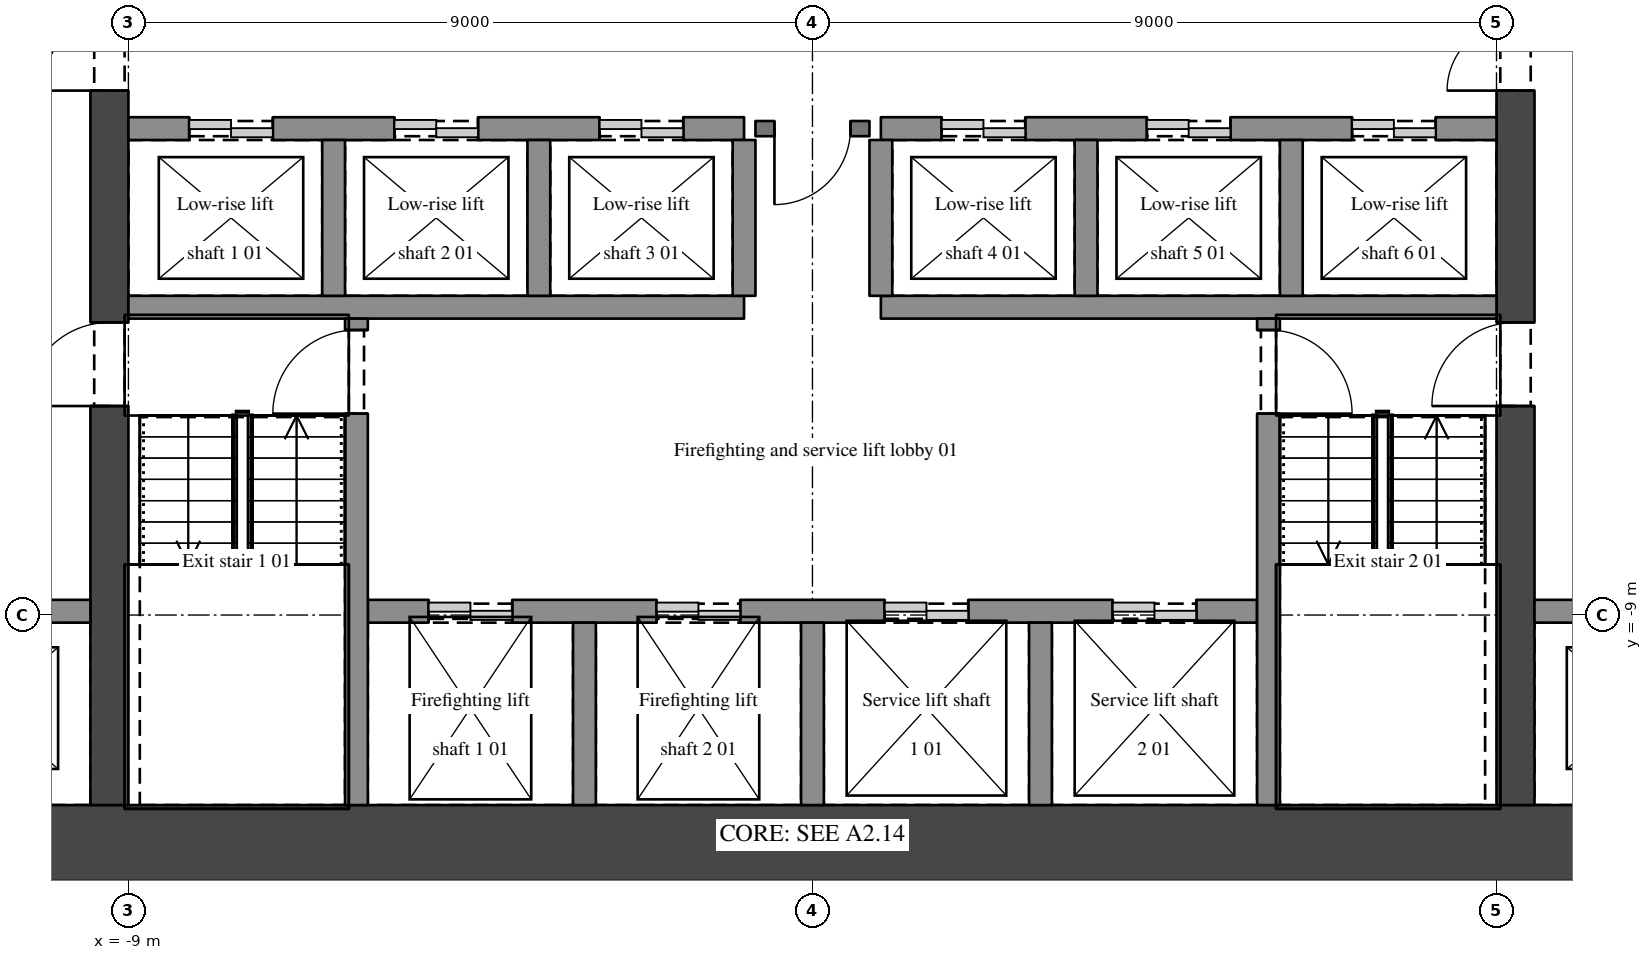
"""IFC4 building model, lengths in metres.
Left out: names, types, materials, properties, quantities, classifications, styles, units other than length and angle.
Written with IfcOpenShell. Run it as: python <this file> out.ifc"""

import sys

from ifc_helpers import new_model, si_unit, direction, frame, frame_2d, origin, place, context, subcontext, project, spatial, rectangle, extrude, element, fill, save


model = new_model("IFC4")
c1 = context("Model", 3, precision=1e-05, world=origin(), true_north=direction((0.0, 1.0)))
c2 = subcontext(c1, "Body", "Model", "MODEL_VIEW")
j1 = project(units=[si_unit("LENGTHUNIT", "METRE"), si_unit("PLANEANGLEUNIT", "RADIAN")], contexts=[c1])
p1 = place(None, origin())
s1 = spatial("IfcSite", under=j1, at=p1, CompositionType="ELEMENT")
p2 = place(p1, origin())
s2 = spatial("IfcBuilding", under=s1, at=p2, CompositionType="ELEMENT")
p3 = place(p2, frame((0.0, 0.0, 108.9)))
s3 = spatial("IfcBuildingStorey", under=s2, at=p3, CompositionType="ELEMENT", Elevation=108.9)
p4 = place(p3, frame((-15.0, -12.0, 0.0), z_axis=(0.0, 0.0, 1.0), x_axis=(1.0, 0.0, 0.0)))
e1 = element("IfcWall", 1, at=p4, inside=s3, PredefinedType="SHEAR", context=c2, shape_type="SweptSolid", body=[
    extrude(rectangle(XDim=30.0, YDim=1.0, at=frame_2d((15.0, 0.0))), origin(), (0.0, 0.0, 1.0), 5.4),
])
p5 = place(p3, frame((-9.25, -11.5, 0.0), z_axis=(0.0, 0.0, 1.0), x_axis=(0.0, 1.0, 0.0)))
e2 = element("IfcWall", 2, at=p5, inside=s3, PredefinedType="SHEAR", context=c2, shape_type="SweptSolid", body=[
    extrude(rectangle(XDim=11.65, YDim=0.5, at=frame_2d((5.825, 0.0))), origin(), (0.0, 0.0, 1.0), 5.4),
])
p6 = place(p5, frame((9.4, 0.0, 0.0)))
e3 = element("IfcOpeningElement", 3, at=p6, cuts=e2, PredefinedType="OPENING", context=c2, shape_type="SweptSolid", body=[
    extrude(rectangle(XDim=1.8, YDim=2.1, at=frame_2d((0.9, 1.05))), frame((0.0, 0.26, 0.0), z_axis=(0.0, -1.0, 0.0), x_axis=(1.0, 0.0, 0.0)), (0.0, 0.0, 1.0), 0.52),
])
p7 = place(p5, frame((5.25, 0.0, 0.0)))
e4 = element("IfcOpeningElement", 4, at=p7, cuts=e2, PredefinedType="OPENING", context=c2, shape_type="SweptSolid", body=[
    extrude(rectangle(XDim=1.1, YDim=2.1, at=frame_2d((0.55, 1.05))), frame((0.0, 0.26, 0.0), z_axis=(0.0, -1.0, 0.0), x_axis=(1.0, 0.0, 0.0)), (0.0, 0.0, 1.0), 0.52),
])
p8 = place(p3, frame((9.25, -11.5, 0.0), z_axis=(0.0, 0.0, 1.0), x_axis=(0.0, 1.0, 0.0)))
e5 = element("IfcWall", 5, at=p8, inside=s3, PredefinedType="SHEAR", context=c2, shape_type="SweptSolid", body=[
    extrude(rectangle(XDim=11.65, YDim=0.5, at=frame_2d((5.825, 0.0))), origin(), (0.0, 0.0, 1.0), 5.4),
])
p9 = place(p8, frame((9.4, 0.0, 0.0)))
e6 = element("IfcOpeningElement", 6, at=p9, cuts=e5, PredefinedType="OPENING", context=c2, shape_type="SweptSolid", body=[
    extrude(rectangle(XDim=1.8, YDim=2.1, at=frame_2d((0.9, 1.05))), frame((0.0, 0.26, 0.0), z_axis=(0.0, -1.0, 0.0), x_axis=(1.0, 0.0, 0.0)), (0.0, 0.0, 1.0), 0.52),
])
p10 = place(p8, frame((5.25, 0.0, 0.0)))
e7 = element("IfcOpeningElement", 7, at=p10, cuts=e5, PredefinedType="OPENING", context=c2, shape_type="SweptSolid", body=[
    extrude(rectangle(XDim=1.1, YDim=2.1, at=frame_2d((0.55, 1.05))), frame((0.0, 0.26, 0.0), z_axis=(0.0, -1.0, 0.0), x_axis=(1.0, 0.0, 0.0)), (0.0, 0.0, 1.0), 0.52),
])
p11 = place(p3, frame((-12.25, -8.95, 0.0), z_axis=(0.0, 0.0, 1.0), x_axis=(1.0, 0.0, 0.0)))
e8 = element("IfcWall", 8, at=p11, inside=s3, PredefinedType="SHEAR", context=c2, shape_type="SweptSolid", body=[
    extrude(rectangle(XDim=2.75, YDim=0.3, at=frame_2d((1.375, 0.0))), origin(), (0.0, 0.0, 1.0), 5.4),
])
p12 = place(p11, frame((0.825, 0.0, 0.0)))
e9 = element("IfcOpeningElement", 9, at=p12, cuts=e8, PredefinedType="OPENING", context=c2, shape_type="SweptSolid", body=[
    extrude(rectangle(XDim=1.1, YDim=2.1, at=frame_2d((0.55, 1.05))), frame((0.0, 0.16, 0.0), z_axis=(0.0, -1.0, 0.0), x_axis=(1.0, 0.0, 0.0)), (0.0, 0.0, 1.0), 0.32),
])
p13 = place(p3, frame((-5.85, -8.95, 0.0), z_axis=(0.0, 0.0, 1.0), x_axis=(1.0, 0.0, 0.0)))
e10 = element("IfcWall", 10, at=p13, inside=s3, PredefinedType="SHEAR", context=c2, shape_type="SweptSolid", body=[
    extrude(rectangle(XDim=11.7, YDim=0.3, at=frame_2d((5.85, 0.0))), origin(), (0.0, 0.0, 1.0), 5.4),
])
p14 = place(p13, frame((0.8, 0.0, 0.0)))
e11 = element("IfcOpeningElement", 11, at=p14, cuts=e10, PredefinedType="OPENING", context=c2, shape_type="SweptSolid", body=[
    extrude(rectangle(XDim=1.1, YDim=2.1, at=frame_2d((0.55, 1.05))), frame((0.0, 0.16, 0.0), z_axis=(0.0, -1.0, 0.0), x_axis=(1.0, 0.0, 0.0)), (0.0, 0.0, 1.0), 0.32),
])
p15 = place(p13, frame((3.8, 0.0, 0.0)))
e12 = element("IfcOpeningElement", 12, at=p15, cuts=e10, PredefinedType="OPENING", context=c2, shape_type="SweptSolid", body=[
    extrude(rectangle(XDim=1.1, YDim=2.1, at=frame_2d((0.55, 1.05))), frame((0.0, 0.16, 0.0), z_axis=(0.0, -1.0, 0.0), x_axis=(1.0, 0.0, 0.0)), (0.0, 0.0, 1.0), 0.32),
])
p16 = place(p13, frame((6.8, 0.0, 0.0)))
e13 = element("IfcOpeningElement", 13, at=p16, cuts=e10, PredefinedType="OPENING", context=c2, shape_type="SweptSolid", body=[
    extrude(rectangle(XDim=1.1, YDim=2.1, at=frame_2d((0.55, 1.05))), frame((0.0, 0.16, 0.0), z_axis=(0.0, -1.0, 0.0), x_axis=(1.0, 0.0, 0.0)), (0.0, 0.0, 1.0), 0.32),
])
p17 = place(p13, frame((9.8, 0.0, 0.0)))
e14 = element("IfcOpeningElement", 14, at=p17, cuts=e10, PredefinedType="OPENING", context=c2, shape_type="SweptSolid", body=[
    extrude(rectangle(XDim=1.1, YDim=2.1, at=frame_2d((0.55, 1.05))), frame((0.0, 0.16, 0.0), z_axis=(0.0, -1.0, 0.0), x_axis=(1.0, 0.0, 0.0)), (0.0, 0.0, 1.0), 0.32),
])
p18 = place(p3, frame((9.5, -8.95, 0.0), z_axis=(0.0, 0.0, 1.0), x_axis=(1.0, 0.0, 0.0)))
e15 = element("IfcWall", 15, at=p18, inside=s3, PredefinedType="SHEAR", context=c2, shape_type="SweptSolid", body=[
    extrude(rectangle(XDim=2.75, YDim=0.3, at=frame_2d((1.375, 0.0))), origin(), (0.0, 0.0, 1.0), 5.4),
])
p19 = place(p18, frame((0.825, 0.0, 0.0)))
e16 = element("IfcOpeningElement", 16, at=p19, cuts=e15, PredefinedType="OPENING", context=c2, shape_type="SweptSolid", body=[
    extrude(rectangle(XDim=1.1, YDim=2.1, at=frame_2d((0.55, 1.05))), frame((0.0, 0.16, 0.0), z_axis=(0.0, -1.0, 0.0), x_axis=(1.0, 0.0, 0.0)), (0.0, 0.0, 1.0), 0.32),
])
for number, where, z_axis, x_axis in (
    (17, (-9.0, -4.95, 0.0), (0.0, 0.0, 1.0), (1.0, 0.0, 0.0)),
    (18, (0.9, -4.95, 0.0), (0.0, 0.0, 1.0), (1.0, 0.0, 0.0)),
):
    element("IfcWall", number, at=place(p3, frame(where, z_axis=z_axis, x_axis=x_axis)), inside=s3, PredefinedType="SHEAR", context=c2, shape_type="SweptSolid", body=[
        extrude(rectangle(XDim=8.1, YDim=0.3, at=frame_2d((4.05, 0.0))), origin(), (0.0, 0.0, 1.0), 5.4),
    ])
p20 = place(p3, frame((-9.0, -2.6, 0.0), z_axis=(0.0, 0.0, 1.0), x_axis=(1.0, 0.0, 0.0)))
e19 = element("IfcWall", 19, at=p20, inside=s3, PredefinedType="SHEAR", context=c2, shape_type="SweptSolid", body=[
    extrude(rectangle(XDim=8.1, YDim=0.3, at=frame_2d((4.05, 0.0))), origin(), (0.0, 0.0, 1.0), 5.4),
])
p21 = place(p20, frame((0.8, 0.0, 0.0)))
e20 = element("IfcOpeningElement", 20, at=p21, cuts=e19, PredefinedType="OPENING", context=c2, shape_type="SweptSolid", body=[
    extrude(rectangle(XDim=1.1, YDim=2.1, at=frame_2d((0.55, 1.05))), frame((0.0, 0.16, 0.0), z_axis=(0.0, -1.0, 0.0), x_axis=(1.0, 0.0, 0.0)), (0.0, 0.0, 1.0), 0.32),
])
p22 = place(p20, frame((3.5, 0.0, 0.0)))
e21 = element("IfcOpeningElement", 21, at=p22, cuts=e19, PredefinedType="OPENING", context=c2, shape_type="SweptSolid", body=[
    extrude(rectangle(XDim=1.1, YDim=2.1, at=frame_2d((0.55, 1.05))), frame((0.0, 0.16, 0.0), z_axis=(0.0, -1.0, 0.0), x_axis=(1.0, 0.0, 0.0)), (0.0, 0.0, 1.0), 0.32),
])
p23 = place(p20, frame((6.2, 0.0, 0.0)))
e22 = element("IfcOpeningElement", 22, at=p23, cuts=e19, PredefinedType="OPENING", context=c2, shape_type="SweptSolid", body=[
    extrude(rectangle(XDim=1.1, YDim=2.1, at=frame_2d((0.55, 1.05))), frame((0.0, 0.16, 0.0), z_axis=(0.0, -1.0, 0.0), x_axis=(1.0, 0.0, 0.0)), (0.0, 0.0, 1.0), 0.32),
])
p24 = place(p3, frame((0.75, -2.6, 0.0), z_axis=(0.0, 0.0, 1.0), x_axis=(-1.0, 0.0, 0.0)))
e23 = element("IfcWall", 23, at=p24, inside=s3, PredefinedType="SOLIDWALL", context=c2, shape_type="SweptSolid", body=[
    extrude(rectangle(XDim=1.5, YDim=0.2, at=frame_2d((0.75, 0.0))), origin(), (0.0, 0.0, 1.0), 5.1),
])
p25 = place(p24, frame((0.25, 0.0, 0.0)))
e24 = element("IfcOpeningElement", 24, at=p25, cuts=e23, PredefinedType="OPENING", context=c2, shape_type="SweptSolid", body=[
    extrude(rectangle(XDim=1.0, YDim=2.1, at=frame_2d((0.5, 1.05))), frame((0.0, 0.11, 0.0), z_axis=(0.0, -1.0, 0.0), x_axis=(1.0, 0.0, 0.0)), (0.0, 0.0, 1.0), 0.22),
])
p26 = place(p3, frame((0.9, -2.6, 0.0), z_axis=(0.0, 0.0, 1.0), x_axis=(1.0, 0.0, 0.0)))
e25 = element("IfcWall", 25, at=p26, inside=s3, PredefinedType="SHEAR", context=c2, shape_type="SweptSolid", body=[
    extrude(rectangle(XDim=8.1, YDim=0.3, at=frame_2d((4.05, 0.0))), origin(), (0.0, 0.0, 1.0), 5.4),
])
p27 = place(p26, frame((0.8, 0.0, 0.0)))
e26 = element("IfcOpeningElement", 26, at=p27, cuts=e25, PredefinedType="OPENING", context=c2, shape_type="SweptSolid", body=[
    extrude(rectangle(XDim=1.1, YDim=2.1, at=frame_2d((0.55, 1.05))), frame((0.0, 0.16, 0.0), z_axis=(0.0, -1.0, 0.0), x_axis=(1.0, 0.0, 0.0)), (0.0, 0.0, 1.0), 0.32),
])
p28 = place(p26, frame((3.5, 0.0, 0.0)))
e27 = element("IfcOpeningElement", 27, at=p28, cuts=e25, PredefinedType="OPENING", context=c2, shape_type="SweptSolid", body=[
    extrude(rectangle(XDim=1.1, YDim=2.1, at=frame_2d((0.55, 1.05))), frame((0.0, 0.16, 0.0), z_axis=(0.0, -1.0, 0.0), x_axis=(1.0, 0.0, 0.0)), (0.0, 0.0, 1.0), 0.32),
])
p29 = place(p26, frame((6.2, 0.0, 0.0)))
e28 = element("IfcOpeningElement", 28, at=p29, cuts=e25, PredefinedType="OPENING", context=c2, shape_type="SweptSolid", body=[
    extrude(rectangle(XDim=1.1, YDim=2.1, at=frame_2d((0.55, 1.05))), frame((0.0, 0.16, 0.0), z_axis=(0.0, -1.0, 0.0), x_axis=(1.0, 0.0, 0.0)), (0.0, 0.0, 1.0), 0.32),
])
p30 = place(p3, frame((-6.3, -4.8, 0.0), z_axis=(0.0, 0.0, 1.0), x_axis=(0.0, 1.0, 0.0)))
e29 = element("IfcWall", 29, at=p30, inside=s3, PredefinedType="SHEAR", context=c2, shape_type="SweptSolid", body=[
    extrude(rectangle(XDim=2.05, YDim=0.3, at=frame_2d((1.025, 0.0))), origin(), (0.0, 0.0, 1.0), 5.4),
])
p31 = place(p3, frame((-6.0, -11.5, 0.0), z_axis=(0.0, 0.0, 1.0), x_axis=(0.0, 1.0, 0.0)))
e30 = element("IfcWall", 30, at=p31, inside=s3, PredefinedType="SHEAR", context=c2, shape_type="SweptSolid", body=[
    extrude(rectangle(XDim=6.4, YDim=0.3, at=frame_2d((3.2, 0.0))), origin(), (0.0, 0.0, 1.0), 5.4),
])
p32 = place(p31, frame((5.15, 0.0, 0.0)))
e31 = element("IfcOpeningElement", 31, at=p32, cuts=e30, PredefinedType="OPENING", context=c2, shape_type="SweptSolid", body=[
    extrude(rectangle(XDim=1.1, YDim=2.1, at=frame_2d((0.55, 1.05))), frame((0.0, 0.16, 0.0), z_axis=(0.0, -1.0, 0.0), x_axis=(1.0, 0.0, 0.0)), (0.0, 0.0, 1.0), 0.32),
])
p33 = place(p3, frame((-3.6, -4.8, 0.0), z_axis=(0.0, 0.0, 1.0), x_axis=(0.0, 1.0, 0.0)))
e32 = element("IfcWall", 32, at=p33, inside=s3, PredefinedType="SHEAR", context=c2, shape_type="SweptSolid", body=[
    extrude(rectangle(XDim=2.05, YDim=0.3, at=frame_2d((1.025, 0.0))), origin(), (0.0, 0.0, 1.0), 5.4),
])
p34 = place(p3, frame((-3.0, -11.5, 0.0), z_axis=(0.0, 0.0, 1.0), x_axis=(0.0, 1.0, 0.0)))
e33 = element("IfcWall", 33, at=p34, inside=s3, PredefinedType="SHEAR", context=c2, shape_type="SweptSolid", body=[
    extrude(rectangle(XDim=2.4, YDim=0.3, at=frame_2d((1.2, 0.0))), origin(), (0.0, 0.0, 1.0), 5.4),
])
p35 = place(p3, frame((-0.9, -4.8, 0.0), z_axis=(0.0, 0.0, 1.0), x_axis=(0.0, 1.0, 0.0)))
e34 = element("IfcWall", 34, at=p35, inside=s3, PredefinedType="SHEAR", context=c2, shape_type="SweptSolid", body=[
    extrude(rectangle(XDim=2.05, YDim=0.3, at=frame_2d((1.025, 0.0))), origin(), (0.0, 0.0, 1.0), 5.4),
])
p36 = place(p3, frame((0.0, -11.5, 0.0), z_axis=(0.0, 0.0, 1.0), x_axis=(0.0, 1.0, 0.0)))
e35 = element("IfcWall", 35, at=p36, inside=s3, PredefinedType="SHEAR", context=c2, shape_type="SweptSolid", body=[
    extrude(rectangle(XDim=2.4, YDim=0.3, at=frame_2d((1.2, 0.0))), origin(), (0.0, 0.0, 1.0), 5.4),
])
p37 = place(p3, frame((0.9, -4.8, 0.0), z_axis=(0.0, 0.0, 1.0), x_axis=(0.0, 1.0, 0.0)))
e36 = element("IfcWall", 36, at=p37, inside=s3, PredefinedType="SHEAR", context=c2, shape_type="SweptSolid", body=[
    extrude(rectangle(XDim=2.05, YDim=0.3, at=frame_2d((1.025, 0.0))), origin(), (0.0, 0.0, 1.0), 5.4),
])
p38 = place(p3, frame((3.0, -11.5, 0.0), z_axis=(0.0, 0.0, 1.0), x_axis=(0.0, 1.0, 0.0)))
e37 = element("IfcWall", 37, at=p38, inside=s3, PredefinedType="SHEAR", context=c2, shape_type="SweptSolid", body=[
    extrude(rectangle(XDim=2.4, YDim=0.3, at=frame_2d((1.2, 0.0))), origin(), (0.0, 0.0, 1.0), 5.4),
])
p39 = place(p3, frame((3.6, -4.8, 0.0), z_axis=(0.0, 0.0, 1.0), x_axis=(0.0, 1.0, 0.0)))
e38 = element("IfcWall", 38, at=p39, inside=s3, PredefinedType="SHEAR", context=c2, shape_type="SweptSolid", body=[
    extrude(rectangle(XDim=2.05, YDim=0.3, at=frame_2d((1.025, 0.0))), origin(), (0.0, 0.0, 1.0), 5.4),
])
p40 = place(p3, frame((6.0, -5.1, 0.0), z_axis=(0.0, 0.0, 1.0), x_axis=(0.0, -1.0, 0.0)))
e39 = element("IfcWall", 39, at=p40, inside=s3, PredefinedType="SHEAR", context=c2, shape_type="SweptSolid", body=[
    extrude(rectangle(XDim=6.4, YDim=0.3, at=frame_2d((3.2, 0.0))), origin(), (0.0, 0.0, 1.0), 5.4),
])
p41 = place(p40, frame((0.15, 0.0, 0.0)))
e40 = element("IfcOpeningElement", 40, at=p41, cuts=e39, PredefinedType="OPENING", context=c2, shape_type="SweptSolid", body=[
    extrude(rectangle(XDim=1.1, YDim=2.1, at=frame_2d((0.55, 1.05))), frame((0.0, 0.16, 0.0), z_axis=(0.0, -1.0, 0.0), x_axis=(1.0, 0.0, 0.0)), (0.0, 0.0, 1.0), 0.32),
])
p42 = place(p3, frame((6.3, -4.8, 0.0), z_axis=(0.0, 0.0, 1.0), x_axis=(0.0, 1.0, 0.0)))
e41 = element("IfcWall", 41, at=p42, inside=s3, PredefinedType="SHEAR", context=c2, shape_type="SweptSolid", body=[
    extrude(rectangle(XDim=2.05, YDim=0.3, at=frame_2d((1.025, 0.0))), origin(), (0.0, 0.0, 1.0), 5.4),
])
p43 = place(p9, origin())
e42 = element("IfcDoor", 42, at=p43, inside=s3, OperationType="DOUBLE_DOOR_SINGLE_SWING", PredefinedType="DOOR", context=c2, shape_type="SweptSolid", body=[
    extrude(rectangle(XDim=1.8, YDim=2.1, at=frame_2d((0.9, 1.05))), frame((0.0, 0.025, 0.0), z_axis=(0.0, -1.0, 0.0), x_axis=(1.0, 0.0, 0.0)), (0.0, 0.0, 1.0), 0.05),
])
fill(e6, e42)
p44 = place(p6, origin())
e43 = element("IfcDoor", 43, at=p44, inside=s3, OperationType="DOUBLE_DOOR_SINGLE_SWING", PredefinedType="DOOR", context=c2, shape_type="SweptSolid", body=[
    extrude(rectangle(XDim=1.8, YDim=2.1, at=frame_2d((0.9, 1.05))), frame((0.0, 0.025, 0.0), z_axis=(0.0, -1.0, 0.0), x_axis=(1.0, 0.0, 0.0)), (0.0, 0.0, 1.0), 0.05),
])
fill(e3, e43)
p45 = place(p25, origin())
e44 = element("IfcDoor", 44, at=p45, inside=s3, OperationType="SINGLE_SWING_RIGHT", PredefinedType="DOOR", context=c2, shape_type="SweptSolid", body=[
    extrude(rectangle(XDim=1.0, YDim=2.1, at=frame_2d((0.5, 1.05))), frame((0.0, 0.025, 0.0), z_axis=(0.0, -1.0, 0.0), x_axis=(1.0, 0.0, 0.0)), (0.0, 0.0, 1.0), 0.05),
])
fill(e24, e44)
p46 = place(p32, origin())
e45 = element("IfcDoor", 45, at=p46, inside=s3, OperationType="SINGLE_SWING_LEFT", PredefinedType="DOOR", context=c2, shape_type="SweptSolid", body=[
    extrude(rectangle(XDim=1.1, YDim=2.1, at=frame_2d((0.55, 1.05))), frame((0.0, 0.025, 0.0), z_axis=(0.0, -1.0, 0.0), x_axis=(1.0, 0.0, 0.0)), (0.0, 0.0, 1.0), 0.05),
])
fill(e31, e45)
p47 = place(p7, origin())
e46 = element("IfcDoor", 46, at=p47, inside=s3, OperationType="SINGLE_SWING_LEFT", PredefinedType="DOOR", context=c2, shape_type="SweptSolid", body=[
    extrude(rectangle(XDim=1.1, YDim=2.1, at=frame_2d((0.55, 1.05))), frame((0.0, 0.025, 0.0), z_axis=(0.0, -1.0, 0.0), x_axis=(1.0, 0.0, 0.0)), (0.0, 0.0, 1.0), 0.05),
])
fill(e4, e46)
p48 = place(p41, origin())
e47 = element("IfcDoor", 47, at=p48, inside=s3, OperationType="SINGLE_SWING_RIGHT", PredefinedType="DOOR", context=c2, shape_type="SweptSolid", body=[
    extrude(rectangle(XDim=1.1, YDim=2.1, at=frame_2d((0.55, 1.05))), frame((0.0, 0.025, 0.0), z_axis=(0.0, -1.0, 0.0), x_axis=(1.0, 0.0, 0.0)), (0.0, 0.0, 1.0), 0.05),
])
fill(e40, e47)
p49 = place(p10, origin())
e48 = element("IfcDoor", 48, at=p49, inside=s3, OperationType="SINGLE_SWING_LEFT", PredefinedType="DOOR", context=c2, shape_type="SweptSolid", body=[
    extrude(rectangle(XDim=1.1, YDim=2.1, at=frame_2d((0.55, 1.05))), frame((0.0, 0.025, 0.0), z_axis=(0.0, -1.0, 0.0), x_axis=(1.0, 0.0, 0.0)), (0.0, 0.0, 1.0), 0.05),
])
fill(e7, e48)
p50 = place(p14, origin())
e49 = element("IfcDoor", 49, at=p50, inside=s3, OperationType="DOUBLE_DOOR_SLIDING", PredefinedType="DOOR", context=c2, shape_type="SweptSolid", body=[
    extrude(rectangle(XDim=1.1, YDim=2.1, at=frame_2d((0.55, 1.05))), frame((0.0, 0.025, 0.0), z_axis=(0.0, -1.0, 0.0), x_axis=(1.0, 0.0, 0.0)), (0.0, 0.0, 1.0), 0.05),
])
fill(e11, e49)
p51 = place(p15, origin())
e50 = element("IfcDoor", 50, at=p51, inside=s3, OperationType="DOUBLE_DOOR_SLIDING", PredefinedType="DOOR", context=c2, shape_type="SweptSolid", body=[
    extrude(rectangle(XDim=1.1, YDim=2.1, at=frame_2d((0.55, 1.05))), frame((0.0, 0.025, 0.0), z_axis=(0.0, -1.0, 0.0), x_axis=(1.0, 0.0, 0.0)), (0.0, 0.0, 1.0), 0.05),
])
fill(e12, e50)
p52 = place(p21, origin())
e51 = element("IfcDoor", 51, at=p52, inside=s3, OperationType="DOUBLE_DOOR_SLIDING", PredefinedType="DOOR", context=c2, shape_type="SweptSolid", body=[
    extrude(rectangle(XDim=1.1, YDim=2.1, at=frame_2d((0.55, 1.05))), frame((0.0, 0.025, 0.0), z_axis=(0.0, -1.0, 0.0), x_axis=(1.0, 0.0, 0.0)), (0.0, 0.0, 1.0), 0.05),
])
fill(e20, e51)
p53 = place(p22, origin())
e52 = element("IfcDoor", 52, at=p53, inside=s3, OperationType="DOUBLE_DOOR_SLIDING", PredefinedType="DOOR", context=c2, shape_type="SweptSolid", body=[
    extrude(rectangle(XDim=1.1, YDim=2.1, at=frame_2d((0.55, 1.05))), frame((0.0, 0.025, 0.0), z_axis=(0.0, -1.0, 0.0), x_axis=(1.0, 0.0, 0.0)), (0.0, 0.0, 1.0), 0.05),
])
fill(e21, e52)
p54 = place(p23, origin())
e53 = element("IfcDoor", 53, at=p54, inside=s3, OperationType="DOUBLE_DOOR_SLIDING", PredefinedType="DOOR", context=c2, shape_type="SweptSolid", body=[
    extrude(rectangle(XDim=1.1, YDim=2.1, at=frame_2d((0.55, 1.05))), frame((0.0, 0.025, 0.0), z_axis=(0.0, -1.0, 0.0), x_axis=(1.0, 0.0, 0.0)), (0.0, 0.0, 1.0), 0.05),
])
fill(e22, e53)
p55 = place(p27, origin())
e54 = element("IfcDoor", 54, at=p55, inside=s3, OperationType="DOUBLE_DOOR_SLIDING", PredefinedType="DOOR", context=c2, shape_type="SweptSolid", body=[
    extrude(rectangle(XDim=1.1, YDim=2.1, at=frame_2d((0.55, 1.05))), frame((0.0, 0.025, 0.0), z_axis=(0.0, -1.0, 0.0), x_axis=(1.0, 0.0, 0.0)), (0.0, 0.0, 1.0), 0.05),
])
fill(e26, e54)
p56 = place(p28, origin())
e55 = element("IfcDoor", 55, at=p56, inside=s3, OperationType="DOUBLE_DOOR_SLIDING", PredefinedType="DOOR", context=c2, shape_type="SweptSolid", body=[
    extrude(rectangle(XDim=1.1, YDim=2.1, at=frame_2d((0.55, 1.05))), frame((0.0, 0.025, 0.0), z_axis=(0.0, -1.0, 0.0), x_axis=(1.0, 0.0, 0.0)), (0.0, 0.0, 1.0), 0.05),
])
fill(e27, e55)
p57 = place(p29, origin())
e56 = element("IfcDoor", 56, at=p57, inside=s3, OperationType="DOUBLE_DOOR_SLIDING", PredefinedType="DOOR", context=c2, shape_type="SweptSolid", body=[
    extrude(rectangle(XDim=1.1, YDim=2.1, at=frame_2d((0.55, 1.05))), frame((0.0, 0.025, 0.0), z_axis=(0.0, -1.0, 0.0), x_axis=(1.0, 0.0, 0.0)), (0.0, 0.0, 1.0), 0.05),
])
fill(e28, e56)
p58 = place(p16, origin())
e57 = element("IfcDoor", 57, at=p58, inside=s3, OperationType="DOUBLE_DOOR_SLIDING", PredefinedType="DOOR", context=c2, shape_type="SweptSolid", body=[
    extrude(rectangle(XDim=1.1, YDim=2.1, at=frame_2d((0.55, 1.05))), frame((0.0, 0.025, 0.0), z_axis=(0.0, -1.0, 0.0), x_axis=(1.0, 0.0, 0.0)), (0.0, 0.0, 1.0), 0.05),
])
fill(e13, e57)
p59 = place(p17, origin())
e58 = element("IfcDoor", 58, at=p59, inside=s3, OperationType="DOUBLE_DOOR_SLIDING", PredefinedType="DOOR", context=c2, shape_type="SweptSolid", body=[
    extrude(rectangle(XDim=1.1, YDim=2.1, at=frame_2d((0.55, 1.05))), frame((0.0, 0.025, 0.0), z_axis=(0.0, -1.0, 0.0), x_axis=(1.0, 0.0, 0.0)), (0.0, 0.0, 1.0), 0.05),
])
fill(e14, e58)
save(model, sys.argv[1])
